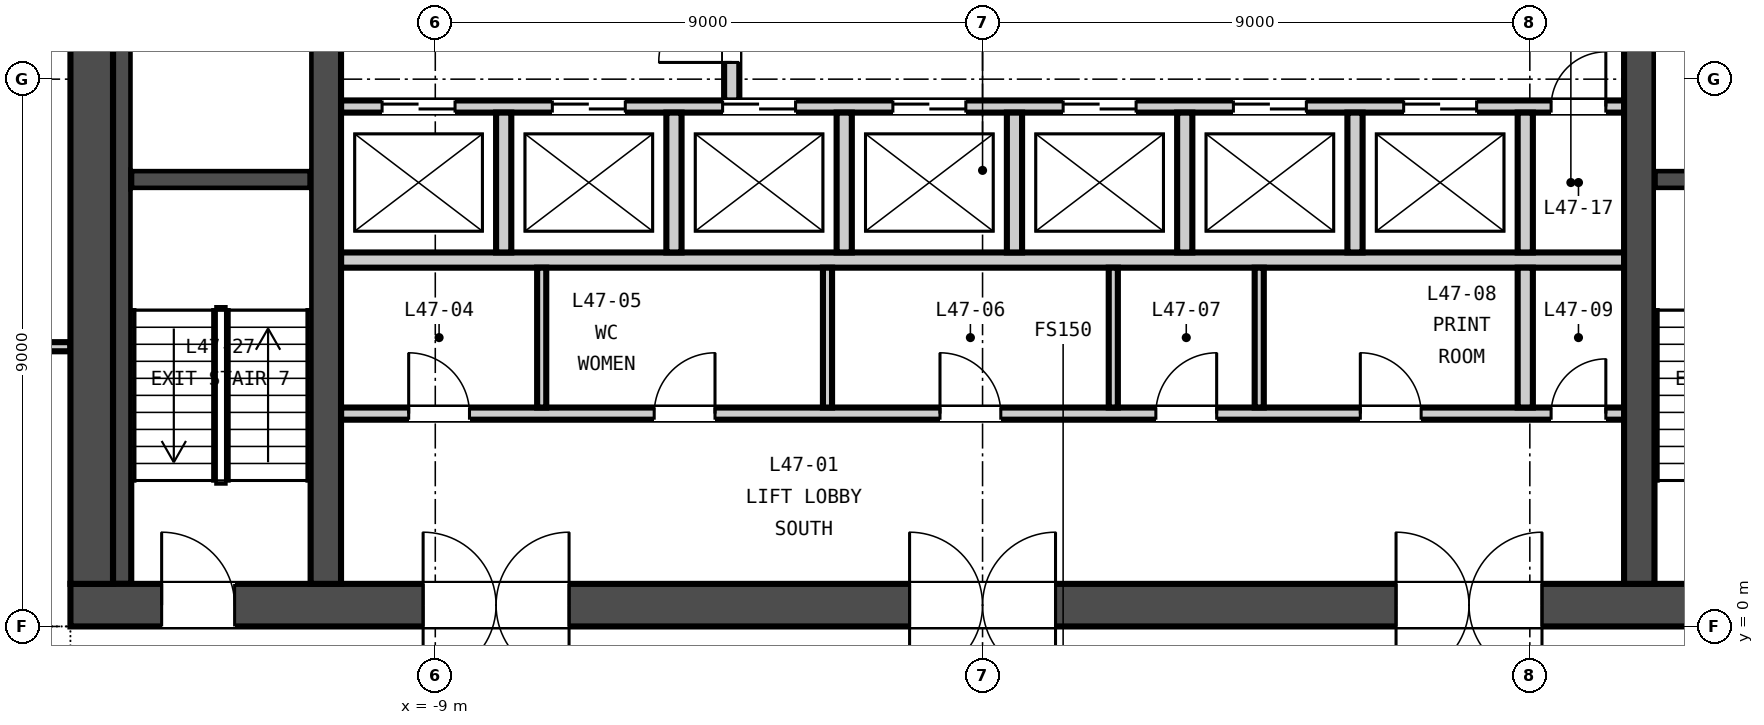
"""IFC4 building model, lengths in metres.
Left out: names, types, materials, properties, quantities, classifications, styles, units other than length and angle.
Written with IfcOpenShell. Run it as: python <this file> out.ifc"""

import sys

from ifc_helpers import new_model, si_unit, direction, frame, frame_2d, origin, place, context, subcontext, project, spatial, rectangle, extrude, element, fill, save


model = new_model("IFC4")
c1 = context("Model", 3, precision=1e-05, world=origin(), true_north=direction((0.0, 1.0)))
c2 = subcontext(c1, "Body", "Model", "MODEL_VIEW")
j1 = project(units=[si_unit("LENGTHUNIT", "METRE"), si_unit("PLANEANGLEUNIT", "RADIAN")], contexts=[c1])
p1 = place(None, origin())
s1 = spatial("IfcSite", under=j1, at=p1, CompositionType="ELEMENT")
p2 = place(p1, origin())
s2 = spatial("IfcBuilding", under=s1, at=p2, CompositionType="ELEMENT")
p3 = place(p2, frame((0.0, 0.0, 189.05)))
s3 = spatial("IfcBuildingStorey", under=s2, at=p3, CompositionType="ELEMENT", Elevation=189.05)
p4 = place(p3, frame((-15.0, 0.35, -0.15), z_axis=(0.0, 0.0, 1.0), x_axis=(1.0, 0.0, 0.0)))
e1 = element("IfcWall", 1, at=p4, inside=s3, PredefinedType="SOLIDWALL", context=c2, shape_type="SweptSolid", body=[
    extrude(rectangle(XDim=30.0, YDim=0.7, at=frame_2d((15.0, 0.0))), origin(), (0.0, 0.0, 1.0), 3.65),
])
p5 = place(p4, frame((5.8, 0.0, 0.15)))
e2 = element("IfcOpeningElement", 2, at=p5, cuts=e1, PredefinedType="OPENING", context=c2, shape_type="SweptSolid", body=[
    extrude(rectangle(XDim=2.4, YDim=2.4, at=frame_2d((1.2, 1.2))), frame((0.0, 0.36, 0.0), z_axis=(0.0, -1.0, 0.0), x_axis=(1.0, 0.0, 0.0)), (0.0, 0.0, 1.0), 0.72),
])
p6 = place(p4, frame((13.8, 0.0, 0.15)))
e3 = element("IfcOpeningElement", 3, at=p6, cuts=e1, PredefinedType="OPENING", context=c2, shape_type="SweptSolid", body=[
    extrude(rectangle(XDim=2.4, YDim=2.4, at=frame_2d((1.2, 1.2))), frame((0.0, 0.36, 0.0), z_axis=(0.0, -1.0, 0.0), x_axis=(1.0, 0.0, 0.0)), (0.0, 0.0, 1.0), 0.72),
])
p7 = place(p4, frame((21.8, 0.0, 0.15)))
e4 = element("IfcOpeningElement", 4, at=p7, cuts=e1, PredefinedType="OPENING", context=c2, shape_type="SweptSolid", body=[
    extrude(rectangle(XDim=2.4, YDim=2.4, at=frame_2d((1.2, 1.2))), frame((0.0, 0.36, 0.0), z_axis=(0.0, -1.0, 0.0), x_axis=(1.0, 0.0, 0.0)), (0.0, 0.0, 1.0), 0.72),
])
p8 = place(p4, frame((1.5, 0.0, 0.15)))
e5 = element("IfcOpeningElement", 5, at=p8, cuts=e1, PredefinedType="OPENING", context=c2, shape_type="SweptSolid", body=[
    extrude(rectangle(XDim=1.2, YDim=2.1, at=frame_2d((0.6, 1.05))), frame((0.0, 0.36, 0.0), z_axis=(0.0, -1.0, 0.0), x_axis=(1.0, 0.0, 0.0)), (0.0, 0.0, 1.0), 0.72),
])
p9 = place(p4, frame((27.3, 0.0, 0.15)))
e6 = element("IfcOpeningElement", 6, at=p9, cuts=e1, PredefinedType="OPENING", context=c2, shape_type="SweptSolid", body=[
    extrude(rectangle(XDim=1.2, YDim=2.1, at=frame_2d((0.6, 1.05))), frame((0.0, 0.36, 0.0), z_axis=(0.0, -1.0, 0.0), x_axis=(1.0, 0.0, 0.0)), (0.0, 0.0, 1.0), 0.72),
])
p10 = place(p3, frame((-14.65, 0.7, -0.15), z_axis=(0.0, 0.0, 1.0), x_axis=(0.0, 1.0, 0.0)))
e7 = element("IfcWall", 7, at=p10, inside=s3, PredefinedType="SOLIDWALL", context=c2, shape_type="SweptSolid", body=[
    extrude(rectangle(XDim=13.6, YDim=0.7, at=frame_2d((6.8, 0.0))), origin(), (0.0, 0.0, 1.0), 3.65),
])
for number, where, z_axis, x_axis in (
    (8, (-10.8, 0.7, -0.15), (0.0, 0.0, 1.0), (0.0, 1.0, 0.0)),
    (9, (10.8, 0.7, -0.15), (0.0, 0.0, 1.0), (0.0, 1.0, 0.0)),
):
    element("IfcWall", number, at=place(p3, frame(where, z_axis=z_axis, x_axis=x_axis)), inside=s3, PredefinedType="SOLIDWALL", context=c2, shape_type="SweptSolid", body=[
        extrude(rectangle(XDim=13.6, YDim=0.5, at=frame_2d((6.8, 0.0))), origin(), (0.0, 0.0, 1.0), 3.65),
    ])
p11 = place(p3, frame((-10.55, 3.5, 0.0), z_axis=(0.0, 0.0, 1.0), x_axis=(1.0, 0.0, 0.0)))
e10 = element("IfcWall", 10, at=p11, inside=s3, PredefinedType="PARTITIONING", context=c2, shape_type="SweptSolid", body=[
    extrude(rectangle(XDim=21.1, YDim=0.2, at=frame_2d((10.55, 0.0))), origin(), (0.0, 0.0, 1.0), 3.5),
])
p12 = place(p11, frame((1.113, 0.0, 0.0)))
e11 = element("IfcOpeningElement", 11, at=p12, cuts=e10, PredefinedType="OPENING", context=c2, shape_type="SweptSolid", body=[
    extrude(rectangle(XDim=1.0, YDim=2.1, at=frame_2d((0.5, 1.05))), frame((0.0, 0.11, 0.0), z_axis=(0.0, -1.0, 0.0), x_axis=(1.0, 0.0, 0.0)), (0.0, 0.0, 1.0), 0.22),
])
p13 = place(p11, frame((5.15, 0.0, 0.0)))
e12 = element("IfcOpeningElement", 12, at=p13, cuts=e10, PredefinedType="OPENING", context=c2, shape_type="SweptSolid", body=[
    extrude(rectangle(XDim=1.0, YDim=2.1, at=frame_2d((0.5, 1.05))), frame((0.0, 0.11, 0.0), z_axis=(0.0, -1.0, 0.0), x_axis=(1.0, 0.0, 0.0)), (0.0, 0.0, 1.0), 0.22),
])
p14 = place(p11, frame((9.85, 0.0, 0.0)))
e13 = element("IfcOpeningElement", 13, at=p14, cuts=e10, PredefinedType="OPENING", context=c2, shape_type="SweptSolid", body=[
    extrude(rectangle(XDim=1.0, YDim=2.1, at=frame_2d((0.5, 1.05))), frame((0.0, 0.11, 0.0), z_axis=(0.0, -1.0, 0.0), x_axis=(1.0, 0.0, 0.0)), (0.0, 0.0, 1.0), 0.22),
])
p15 = place(p11, frame((13.4, 0.0, 0.0)))
e14 = element("IfcOpeningElement", 14, at=p15, cuts=e10, PredefinedType="OPENING", context=c2, shape_type="SweptSolid", body=[
    extrude(rectangle(XDim=1.0, YDim=2.1, at=frame_2d((0.5, 1.05))), frame((0.0, 0.11, 0.0), z_axis=(0.0, -1.0, 0.0), x_axis=(1.0, 0.0, 0.0)), (0.0, 0.0, 1.0), 0.22),
])
p16 = place(p11, frame((16.762, 0.0, 0.0)))
e15 = element("IfcOpeningElement", 15, at=p16, cuts=e10, PredefinedType="OPENING", context=c2, shape_type="SweptSolid", body=[
    extrude(rectangle(XDim=1.0, YDim=2.1, at=frame_2d((0.5, 1.05))), frame((0.0, 0.11, 0.0), z_axis=(0.0, -1.0, 0.0), x_axis=(1.0, 0.0, 0.0)), (0.0, 0.0, 1.0), 0.22),
])
p17 = place(p11, frame((19.9, 0.0, 0.0)))
e16 = element("IfcOpeningElement", 16, at=p17, cuts=e10, PredefinedType="OPENING", context=c2, shape_type="SweptSolid", body=[
    extrude(rectangle(XDim=0.9, YDim=2.1, at=frame_2d((0.45, 1.05))), frame((0.0, 0.11, 0.0), z_axis=(0.0, -1.0, 0.0), x_axis=(1.0, 0.0, 0.0)), (0.0, 0.0, 1.0), 0.22),
])
p18 = place(p3, frame((-10.55, 6.025, 0.0), z_axis=(0.0, 0.0, 1.0), x_axis=(1.0, 0.0, 0.0)))
e17 = element("IfcWall", 17, at=p18, inside=s3, PredefinedType="PARTITIONING", context=c2, shape_type="SweptSolid", body=[
    extrude(rectangle(XDim=21.1, YDim=0.25, at=frame_2d((10.55, 0.0))), origin(), (0.0, 0.0, 1.0), 3.5),
])
p19 = place(p3, frame((-10.55, 8.55, 0.0), z_axis=(0.0, 0.0, 1.0), x_axis=(1.0, 0.0, 0.0)))
e18 = element("IfcWall", 18, at=p19, inside=s3, PredefinedType="PARTITIONING", context=c2, shape_type="SweptSolid", body=[
    extrude(rectangle(XDim=21.1, YDim=0.2, at=frame_2d((10.55, 0.0))), origin(), (0.0, 0.0, 1.0), 3.5),
])
p20 = place(p19, frame((0.675, 0.0, 0.0)))
e19 = element("IfcOpeningElement", 19, at=p20, cuts=e18, PredefinedType="OPENING", context=c2, shape_type="SweptSolid", body=[
    extrude(rectangle(XDim=1.2, YDim=2.1, at=frame_2d((0.6, 1.05))), frame((0.0, 0.11, 0.0), z_axis=(0.0, -1.0, 0.0), x_axis=(1.0, 0.0, 0.0)), (0.0, 0.0, 1.0), 0.22),
])
p21 = place(p19, frame((3.475, 0.0, 0.0)))
e20 = element("IfcOpeningElement", 20, at=p21, cuts=e18, PredefinedType="OPENING", context=c2, shape_type="SweptSolid", body=[
    extrude(rectangle(XDim=1.2, YDim=2.1, at=frame_2d((0.6, 1.05))), frame((0.0, 0.11, 0.0), z_axis=(0.0, -1.0, 0.0), x_axis=(1.0, 0.0, 0.0)), (0.0, 0.0, 1.0), 0.22),
])
p22 = place(p19, frame((6.275, 0.0, 0.0)))
e21 = element("IfcOpeningElement", 21, at=p22, cuts=e18, PredefinedType="OPENING", context=c2, shape_type="SweptSolid", body=[
    extrude(rectangle(XDim=1.2, YDim=2.1, at=frame_2d((0.6, 1.05))), frame((0.0, 0.11, 0.0), z_axis=(0.0, -1.0, 0.0), x_axis=(1.0, 0.0, 0.0)), (0.0, 0.0, 1.0), 0.22),
])
p23 = place(p19, frame((9.075, 0.0, 0.0)))
e22 = element("IfcOpeningElement", 22, at=p23, cuts=e18, PredefinedType="OPENING", context=c2, shape_type="SweptSolid", body=[
    extrude(rectangle(XDim=1.2, YDim=2.1, at=frame_2d((0.6, 1.05))), frame((0.0, 0.11, 0.0), z_axis=(0.0, -1.0, 0.0), x_axis=(1.0, 0.0, 0.0)), (0.0, 0.0, 1.0), 0.22),
])
p24 = place(p19, frame((11.875, 0.0, 0.0)))
e23 = element("IfcOpeningElement", 23, at=p24, cuts=e18, PredefinedType="OPENING", context=c2, shape_type="SweptSolid", body=[
    extrude(rectangle(XDim=1.2, YDim=2.1, at=frame_2d((0.6, 1.05))), frame((0.0, 0.11, 0.0), z_axis=(0.0, -1.0, 0.0), x_axis=(1.0, 0.0, 0.0)), (0.0, 0.0, 1.0), 0.22),
])
p25 = place(p19, frame((14.675, 0.0, 0.0)))
e24 = element("IfcOpeningElement", 24, at=p25, cuts=e18, PredefinedType="OPENING", context=c2, shape_type="SweptSolid", body=[
    extrude(rectangle(XDim=1.2, YDim=2.1, at=frame_2d((0.6, 1.05))), frame((0.0, 0.11, 0.0), z_axis=(0.0, -1.0, 0.0), x_axis=(1.0, 0.0, 0.0)), (0.0, 0.0, 1.0), 0.22),
])
p26 = place(p19, frame((17.475, 0.0, 0.0)))
e25 = element("IfcOpeningElement", 25, at=p26, cuts=e18, PredefinedType="OPENING", context=c2, shape_type="SweptSolid", body=[
    extrude(rectangle(XDim=1.2, YDim=2.1, at=frame_2d((0.6, 1.05))), frame((0.0, 0.11, 0.0), z_axis=(0.0, -1.0, 0.0), x_axis=(1.0, 0.0, 0.0)), (0.0, 0.0, 1.0), 0.22),
])
p27 = place(p19, frame((19.9, 0.0, 0.0)))
e26 = element("IfcOpeningElement", 26, at=p27, cuts=e18, PredefinedType="OPENING", context=c2, shape_type="SweptSolid", body=[
    extrude(rectangle(XDim=0.9, YDim=2.1, at=frame_2d((0.45, 1.05))), frame((0.0, 0.11, 0.0), z_axis=(0.0, -1.0, 0.0), x_axis=(1.0, 0.0, 0.0)), (0.0, 0.0, 1.0), 0.22),
])
p28 = place(p3, frame((-4.125, 8.65, 0.0), z_axis=(0.0, 0.0, 1.0), x_axis=(0.0, 1.0, 0.0)))
e27 = element("IfcWall", 27, at=p28, inside=s3, PredefinedType="PARTITIONING", context=c2, shape_type="SweptSolid", body=[
    extrude(rectangle(XDim=2.45, YDim=0.25, at=frame_2d((1.225, 0.0))), origin(), (0.0, 0.0, 1.0), 3.5),
])
p29 = place(p28, frame((0.625, 0.0, 0.0)))
e28 = element("IfcOpeningElement", 28, at=p29, cuts=e27, PredefinedType="OPENING", context=c2, shape_type="SweptSolid", body=[
    extrude(rectangle(XDim=1.2, YDim=2.1, at=frame_2d((0.6, 1.05))), frame((0.0, 0.135, 0.0), z_axis=(0.0, -1.0, 0.0), x_axis=(1.0, 0.0, 0.0)), (0.0, 0.0, 1.0), 0.27),
])
for number, where, z_axis, x_axis in (
    (29, (-7.25, 3.6, 0.0), (0.0, 0.0, 1.0), (0.0, 1.0, 0.0)),
    (30, (-2.55, 3.6, 0.0), (0.0, 0.0, 1.0), (0.0, 1.0, 0.0)),
    (31, (2.15, 3.6, 0.0), (0.0, 0.0, 1.0), (0.0, 1.0, 0.0)),
    (32, (4.55, 3.6, 0.0), (0.0, 0.0, 1.0), (0.0, 1.0, 0.0)),
):
    element("IfcWall", number, at=place(p3, frame(where, z_axis=z_axis, x_axis=x_axis)), inside=s3, PredefinedType="PARTITIONING", context=c2, shape_type="SweptSolid", body=[
        extrude(rectangle(XDim=2.3, YDim=0.15, at=frame_2d((1.15, 0.0))), origin(), (0.0, 0.0, 1.0), 3.5),
    ])
p30 = place(p3, frame((8.925, 3.6, 0.0), z_axis=(0.0, 0.0, 1.0), x_axis=(0.0, 1.0, 0.0)))
e33 = element("IfcWall", 33, at=p30, inside=s3, PredefinedType="PARTITIONING", context=c2, shape_type="SweptSolid", body=[
    extrude(rectangle(XDim=2.3, YDim=0.25, at=frame_2d((1.15, 0.0))), origin(), (0.0, 0.0, 1.0), 3.5),
])
for number, where, z_axis, x_axis in (
    (34, (-7.875, 6.15, 0.0), (0.0, 0.0, 1.0), (0.0, 1.0, 0.0)),
    (35, (-5.075, 6.15, 0.0), (0.0, 0.0, 1.0), (0.0, 1.0, 0.0)),
    (36, (-2.275, 6.15, 0.0), (0.0, 0.0, 1.0), (0.0, 1.0, 0.0)),
    (37, (0.525, 6.15, 0.0), (0.0, 0.0, 1.0), (0.0, 1.0, 0.0)),
    (38, (3.325, 6.15, 0.0), (0.0, 0.0, 1.0), (0.0, 1.0, 0.0)),
    (39, (6.125, 6.15, 0.0), (0.0, 0.0, 1.0), (0.0, 1.0, 0.0)),
    (40, (8.925, 6.15, 0.0), (0.0, 0.0, 1.0), (0.0, 1.0, 0.0)),
):
    element("IfcWall", number, at=place(p3, frame(where, z_axis=z_axis, x_axis=x_axis)), inside=s3, PredefinedType="PARTITIONING", context=c2, shape_type="SweptSolid", body=[
        extrude(rectangle(XDim=2.3, YDim=0.25, at=frame_2d((1.15, 0.0))), origin(), (0.0, 0.0, 1.0), 3.5),
    ])
p31 = place(p3, frame((-14.0, 7.35, 0.0), z_axis=(0.0, 0.0, 1.0), x_axis=(1.0, 0.0, 0.0)))
e41 = element("IfcWall", 41, at=p31, inside=s3, PredefinedType="SOLIDWALL", context=c2, shape_type="SweptSolid", body=[
    extrude(rectangle(XDim=2.95, YDim=0.3, at=frame_2d((1.475, 0.0))), origin(), (0.0, 0.0, 1.0), 3.5),
])
p32 = place(p3, frame((-14.15, 0.7, 0.0), z_axis=(0.0, 0.0, 1.0), x_axis=(0.0, 1.0, 0.0)))
e42 = element("IfcWall", 42, at=p32, inside=s3, PredefinedType="SOLIDWALL", context=c2, shape_type="SweptSolid", body=[
    extrude(rectangle(XDim=13.6, YDim=0.3, at=frame_2d((6.8, 0.0))), origin(), (0.0, 0.0, 1.0), 3.5),
])
p33 = place(p3, frame((11.05, 7.35, 0.0), z_axis=(0.0, 0.0, 1.0), x_axis=(1.0, 0.0, 0.0)))
e43 = element("IfcWall", 43, at=p33, inside=s3, PredefinedType="SOLIDWALL", context=c2, shape_type="SweptSolid", body=[
    extrude(rectangle(XDim=2.95, YDim=0.3, at=frame_2d((1.475, 0.0))), origin(), (0.0, 0.0, 1.0), 3.5),
])
p34 = place(p3, frame((-18.925, 4.6, 0.0), z_axis=(0.0, 0.0, 1.0), x_axis=(1.0, 0.0, 0.0)))
e44 = element("IfcWall", 44, at=p34, inside=s3, PredefinedType="PARTITIONING", context=c2, shape_type="SweptSolid", body=[
    extrude(rectangle(XDim=3.925, YDim=0.15, at=frame_2d((1.962, 0.0))), origin(), (0.0, 0.0, 1.0), 2.741),
])
p35 = place(p29, origin())
e45 = element("IfcDoor", 45, at=p35, inside=s3, OperationType="SINGLE_SWING_LEFT", PredefinedType="DOOR", context=c2, shape_type="SweptSolid", body=[
    extrude(rectangle(XDim=1.2, YDim=2.1, at=frame_2d((0.6, 1.05))), frame((0.0, 0.025, 0.0), z_axis=(0.0, -1.0, 0.0), x_axis=(1.0, 0.0, 0.0)), (0.0, 0.0, 1.0), 0.05),
])
fill(e28, e45)
p36 = place(p12, origin())
e46 = element("IfcDoor", 46, at=p36, inside=s3, OperationType="SINGLE_SWING_LEFT", PredefinedType="DOOR", context=c2, shape_type="SweptSolid", body=[
    extrude(rectangle(XDim=1.0, YDim=2.1, at=frame_2d((0.5, 1.05))), frame((0.0, 0.025, 0.0), z_axis=(0.0, -1.0, 0.0), x_axis=(1.0, 0.0, 0.0)), (0.0, 0.0, 1.0), 0.05),
])
fill(e11, e46)
p37 = place(p13, origin())
e47 = element("IfcDoor", 47, at=p37, inside=s3, OperationType="SINGLE_SWING_RIGHT", PredefinedType="DOOR", context=c2, shape_type="SweptSolid", body=[
    extrude(rectangle(XDim=1.0, YDim=2.1, at=frame_2d((0.5, 1.05))), frame((0.0, 0.025, 0.0), z_axis=(0.0, -1.0, 0.0), x_axis=(1.0, 0.0, 0.0)), (0.0, 0.0, 1.0), 0.05),
])
fill(e12, e47)
p38 = place(p14, origin())
e48 = element("IfcDoor", 48, at=p38, inside=s3, OperationType="SINGLE_SWING_LEFT", PredefinedType="DOOR", context=c2, shape_type="SweptSolid", body=[
    extrude(rectangle(XDim=1.0, YDim=2.1, at=frame_2d((0.5, 1.05))), frame((0.0, 0.025, 0.0), z_axis=(0.0, -1.0, 0.0), x_axis=(1.0, 0.0, 0.0)), (0.0, 0.0, 1.0), 0.05),
])
fill(e13, e48)
p39 = place(p15, origin())
e49 = element("IfcDoor", 49, at=p39, inside=s3, OperationType="SINGLE_SWING_RIGHT", PredefinedType="DOOR", context=c2, shape_type="SweptSolid", body=[
    extrude(rectangle(XDim=1.0, YDim=2.1, at=frame_2d((0.5, 1.05))), frame((0.0, 0.025, 0.0), z_axis=(0.0, -1.0, 0.0), x_axis=(1.0, 0.0, 0.0)), (0.0, 0.0, 1.0), 0.05),
])
fill(e14, e49)
p40 = place(p16, origin())
e50 = element("IfcDoor", 50, at=p40, inside=s3, OperationType="SINGLE_SWING_LEFT", PredefinedType="DOOR", context=c2, shape_type="SweptSolid", body=[
    extrude(rectangle(XDim=1.0, YDim=2.1, at=frame_2d((0.5, 1.05))), frame((0.0, 0.025, 0.0), z_axis=(0.0, -1.0, 0.0), x_axis=(1.0, 0.0, 0.0)), (0.0, 0.0, 1.0), 0.05),
])
fill(e15, e50)
p41 = place(p17, origin())
e51 = element("IfcDoor", 51, at=p41, inside=s3, OperationType="SINGLE_SWING_RIGHT", PredefinedType="DOOR", context=c2, shape_type="SweptSolid", body=[
    extrude(rectangle(XDim=0.9, YDim=2.1, at=frame_2d((0.45, 1.05))), frame((0.0, 0.025, 0.0), z_axis=(0.0, -1.0, 0.0), x_axis=(1.0, 0.0, 0.0)), (0.0, 0.0, 1.0), 0.05),
])
fill(e16, e51)
p42 = place(p20, origin())
e52 = element("IfcDoor", 52, at=p42, inside=s3, OperationType="DOUBLE_DOOR_SLIDING", PredefinedType="DOOR", context=c2, shape_type="SweptSolid", body=[
    extrude(rectangle(XDim=1.2, YDim=2.1, at=frame_2d((0.6, 1.05))), frame((0.0, 0.025, 0.0), z_axis=(0.0, -1.0, 0.0), x_axis=(1.0, 0.0, 0.0)), (0.0, 0.0, 1.0), 0.05),
])
fill(e19, e52)
p43 = place(p21, origin())
e53 = element("IfcDoor", 53, at=p43, inside=s3, OperationType="DOUBLE_DOOR_SLIDING", PredefinedType="DOOR", context=c2, shape_type="SweptSolid", body=[
    extrude(rectangle(XDim=1.2, YDim=2.1, at=frame_2d((0.6, 1.05))), frame((0.0, 0.025, 0.0), z_axis=(0.0, -1.0, 0.0), x_axis=(1.0, 0.0, 0.0)), (0.0, 0.0, 1.0), 0.05),
])
fill(e20, e53)
p44 = place(p22, origin())
e54 = element("IfcDoor", 54, at=p44, inside=s3, OperationType="DOUBLE_DOOR_SLIDING", PredefinedType="DOOR", context=c2, shape_type="SweptSolid", body=[
    extrude(rectangle(XDim=1.2, YDim=2.1, at=frame_2d((0.6, 1.05))), frame((0.0, 0.025, 0.0), z_axis=(0.0, -1.0, 0.0), x_axis=(1.0, 0.0, 0.0)), (0.0, 0.0, 1.0), 0.05),
])
fill(e21, e54)
p45 = place(p23, origin())
e55 = element("IfcDoor", 55, at=p45, inside=s3, OperationType="DOUBLE_DOOR_SLIDING", PredefinedType="DOOR", context=c2, shape_type="SweptSolid", body=[
    extrude(rectangle(XDim=1.2, YDim=2.1, at=frame_2d((0.6, 1.05))), frame((0.0, 0.025, 0.0), z_axis=(0.0, -1.0, 0.0), x_axis=(1.0, 0.0, 0.0)), (0.0, 0.0, 1.0), 0.05),
])
fill(e22, e55)
p46 = place(p24, origin())
e56 = element("IfcDoor", 56, at=p46, inside=s3, OperationType="DOUBLE_DOOR_SLIDING", PredefinedType="DOOR", context=c2, shape_type="SweptSolid", body=[
    extrude(rectangle(XDim=1.2, YDim=2.1, at=frame_2d((0.6, 1.05))), frame((0.0, 0.025, 0.0), z_axis=(0.0, -1.0, 0.0), x_axis=(1.0, 0.0, 0.0)), (0.0, 0.0, 1.0), 0.05),
])
fill(e23, e56)
p47 = place(p25, origin())
e57 = element("IfcDoor", 57, at=p47, inside=s3, OperationType="DOUBLE_DOOR_SLIDING", PredefinedType="DOOR", context=c2, shape_type="SweptSolid", body=[
    extrude(rectangle(XDim=1.2, YDim=2.1, at=frame_2d((0.6, 1.05))), frame((0.0, 0.025, 0.0), z_axis=(0.0, -1.0, 0.0), x_axis=(1.0, 0.0, 0.0)), (0.0, 0.0, 1.0), 0.05),
])
fill(e24, e57)
p48 = place(p26, origin())
e58 = element("IfcDoor", 58, at=p48, inside=s3, OperationType="DOUBLE_DOOR_SLIDING", PredefinedType="DOOR", context=c2, shape_type="SweptSolid", body=[
    extrude(rectangle(XDim=1.2, YDim=2.1, at=frame_2d((0.6, 1.05))), frame((0.0, 0.025, 0.0), z_axis=(0.0, -1.0, 0.0), x_axis=(1.0, 0.0, 0.0)), (0.0, 0.0, 1.0), 0.05),
])
fill(e25, e58)
p49 = place(p27, origin())
e59 = element("IfcDoor", 59, at=p49, inside=s3, OperationType="SINGLE_SWING_RIGHT", PredefinedType="DOOR", context=c2, shape_type="SweptSolid", body=[
    extrude(rectangle(XDim=0.9, YDim=2.1, at=frame_2d((0.45, 1.05))), frame((0.0, 0.025, 0.0), z_axis=(0.0, -1.0, 0.0), x_axis=(1.0, 0.0, 0.0)), (0.0, 0.0, 1.0), 0.05),
])
fill(e26, e59)
p50 = place(p5, origin())
e60 = element("IfcDoor", 60, at=p50, inside=s3, OperationType="DOUBLE_DOOR_DOUBLE_SWING", PredefinedType="DOOR", context=c2, shape_type="SweptSolid", body=[
    extrude(rectangle(XDim=2.4, YDim=2.4, at=frame_2d((1.2, 1.2))), frame((0.0, 0.025, 0.0), z_axis=(0.0, -1.0, 0.0), x_axis=(1.0, 0.0, 0.0)), (0.0, 0.0, 1.0), 0.05),
])
fill(e2, e60)
p51 = place(p6, origin())
e61 = element("IfcDoor", 61, at=p51, inside=s3, OperationType="DOUBLE_DOOR_DOUBLE_SWING", PredefinedType="DOOR", context=c2, shape_type="SweptSolid", body=[
    extrude(rectangle(XDim=2.4, YDim=2.4, at=frame_2d((1.2, 1.2))), frame((0.0, 0.025, 0.0), z_axis=(0.0, -1.0, 0.0), x_axis=(1.0, 0.0, 0.0)), (0.0, 0.0, 1.0), 0.05),
])
fill(e3, e61)
p52 = place(p7, origin())
e62 = element("IfcDoor", 62, at=p52, inside=s3, OperationType="DOUBLE_DOOR_DOUBLE_SWING", PredefinedType="DOOR", context=c2, shape_type="SweptSolid", body=[
    extrude(rectangle(XDim=2.4, YDim=2.4, at=frame_2d((1.2, 1.2))), frame((0.0, 0.025, 0.0), z_axis=(0.0, -1.0, 0.0), x_axis=(1.0, 0.0, 0.0)), (0.0, 0.0, 1.0), 0.05),
])
fill(e4, e62)
p53 = place(p8, origin())
e63 = element("IfcDoor", 63, at=p53, inside=s3, OperationType="SINGLE_SWING_LEFT", PredefinedType="DOOR", context=c2, shape_type="SweptSolid", body=[
    extrude(rectangle(XDim=1.2, YDim=2.1, at=frame_2d((0.6, 1.05))), frame((0.0, 0.025, 0.0), z_axis=(0.0, -1.0, 0.0), x_axis=(1.0, 0.0, 0.0)), (0.0, 0.0, 1.0), 0.05),
])
fill(e5, e63)
save(model, sys.argv[1])
